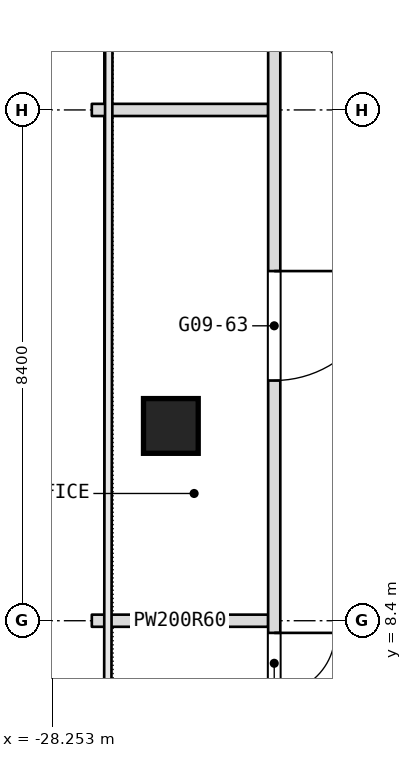
"""IFC4 building model, lengths in metres.
Left out: names, types, materials, properties, quantities, classifications, styles, units other than length and angle.
Written with IfcOpenShell. Run it as: python <this file> out.ifc"""

import sys

from ifc_helpers import new_model, si_unit, direction, frame, frame_2d, origin, origin_2d, place, context, subcontext, project, spatial, rectangle, extrude, element, fill, save


model = new_model("IFC4")
c1 = context("Model", 3, precision=1e-05, world=origin(), true_north=direction((0.0, 1.0)))
c2 = subcontext(c1, "Body", "Model", "MODEL_VIEW")
j1 = project(units=[si_unit("LENGTHUNIT", "METRE"), si_unit("PLANEANGLEUNIT", "RADIAN")], contexts=[c1])
p1 = place(None, origin())
s1 = spatial("IfcSite", under=j1, at=p1, CompositionType="ELEMENT")
p2 = place(p1, origin())
s2 = spatial("IfcBuilding", under=s1, at=p2, CompositionType="ELEMENT")
p3 = place(p2, frame((0.0, 0.0, 115.7)))
s3 = spatial("IfcBuildingStorey", under=s2, at=p3, CompositionType="ELEMENT", Elevation=115.7)
p4 = place(p3, frame((-26.3, 11.603, 0.0), z_axis=(0.0, 0.0, 1.0), x_axis=(1.0, 0.0, 0.0)))
e1 = element("IfcColumn", 1, at=p4, inside=s3, PredefinedType="COLUMN", context=c2, shape_type="SweptSolid", body=[
    extrude(rectangle(XDim=0.9, YDim=0.9, at=origin_2d()), origin(), (0.0, 0.0, 1.0), 3.6),
])
for number, where, z_axis, x_axis in (
    (2, (-27.6, 8.4, 0.0), (0.0, 0.0, 1.0), (1.0, 0.0, 0.0)),
    (3, (-27.6, 16.8, 0.0), (0.0, 0.0, 1.0), (1.0, 0.0, 0.0)),
):
    element("IfcWall", number, at=place(p3, frame(where, z_axis=z_axis, x_axis=x_axis)), inside=s3, PredefinedType="PARTITIONING", context=c2, shape_type="SweptSolid", body=[
        extrude(rectangle(XDim=2.9, YDim=0.2, at=frame_2d((1.45, 0.0))), origin(), (0.0, 0.0, 1.0), 2.89),
    ])
p5 = place(p3, frame((-24.6, 6.9, 0.0), z_axis=(0.0, 0.0, 1.0), x_axis=(0.0, 1.0, 0.0)))
e4 = element("IfcWall", 4, at=p5, inside=s3, PredefinedType="PARTITIONING", context=c2, shape_type="SweptSolid", body=[
    extrude(rectangle(XDim=11.6, YDim=0.2, at=frame_2d((5.8, 0.0))), origin(), (0.0, 0.0, 1.0), 3.34),
])
p6 = place(p5, frame((5.45, 0.0, 0.0)))
e5 = element("IfcOpeningElement", 5, at=p6, cuts=e4, PredefinedType="OPENING", context=c2, shape_type="SweptSolid", body=[
    extrude(rectangle(XDim=1.8, YDim=2.1, at=frame_2d((0.9, 1.05))), frame((0.0, 0.1, 0.0), z_axis=(0.0, -1.0, 0.0), x_axis=(1.0, 0.0, 0.0)), (0.0, 0.0, 1.0), 0.2),
])
p7 = place(p5, frame((0.3, 0.0, 0.0)))
e6 = element("IfcOpeningElement", 6, at=p7, cuts=e4, PredefinedType="OPENING", context=c2, shape_type="SweptSolid", body=[
    extrude(rectangle(XDim=1.0, YDim=2.1, at=frame_2d((0.5, 1.05))), frame((0.0, 0.1, 0.0), z_axis=(0.0, -1.0, 0.0), x_axis=(1.0, 0.0, 0.0)), (0.0, 0.0, 1.0), 0.2),
])
p8 = place(p6, origin())
e7 = element("IfcDoor", 7, at=p8, inside=s3, OperationType="DOUBLE_DOOR_SINGLE_SWING", PredefinedType="DOOR", context=c2, shape_type="SweptSolid", body=[
    extrude(rectangle(XDim=1.8, YDim=2.1, at=frame_2d((0.9, 1.05))), frame((0.0, 0.025, 0.0), z_axis=(0.0, -1.0, 0.0), x_axis=(1.0, 0.0, 0.0)), (0.0, 0.0, 1.0), 0.05),
])
fill(e5, e7)
p9 = place(p7, origin())
e8 = element("IfcDoor", 8, at=p9, inside=s3, OperationType="SINGLE_SWING_LEFT", PredefinedType="DOOR", context=c2, shape_type="SweptSolid", body=[
    extrude(rectangle(XDim=1.0, YDim=2.1, at=frame_2d((0.5, 1.05))), frame((0.0, 0.025, 0.0), z_axis=(0.0, -1.0, 0.0), x_axis=(1.0, 0.0, 0.0)), (0.0, 0.0, 1.0), 0.05),
])
fill(e6, e8)
save(model, sys.argv[1])
